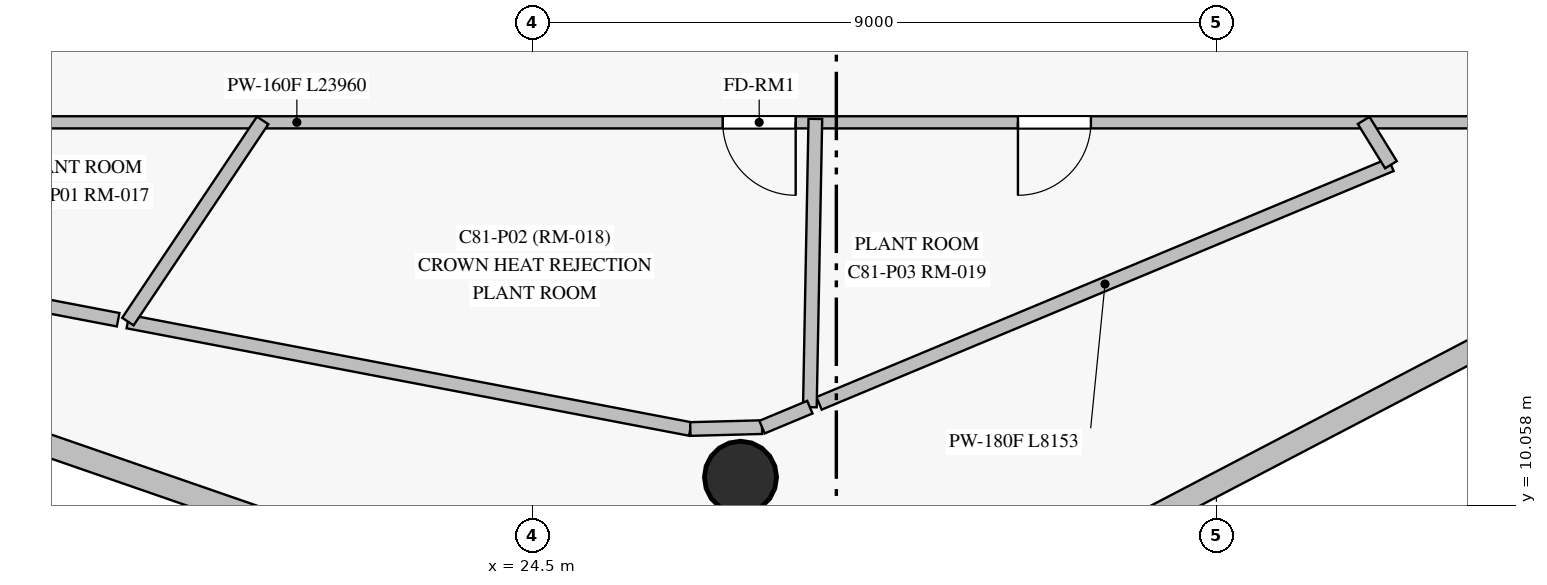
"""IFC4 building model, lengths in metres.
Left out: names, types, materials, properties, quantities, classifications, styles, units other than length and angle.
Written with IfcOpenShell. Run it as: python <this file> out.ifc"""

import sys

from ifc_helpers import new_model, si_unit, direction, frame, frame_2d, origin, origin_with_axes, origin_2d, place, context, subcontext, project, spatial, rectangle, circle, extrude, source, transform, mapped, element, fill, save


model = new_model("IFC4")
c1 = context("Model", 3, precision=1e-05, world=origin(), true_north=direction((0.0, 1.0)))
c2 = subcontext(c1, "Body", "Model", "MODEL_VIEW")
j1 = project(units=[si_unit("LENGTHUNIT", "METRE"), si_unit("PLANEANGLEUNIT", "RADIAN")], contexts=[c1])
p1 = place(None, origin())
s1 = spatial("IfcSite", under=j1, at=p1, CompositionType="ELEMENT")
p2 = place(p1, origin())
s2 = spatial("IfcBuilding", under=s1, at=p2, CompositionType="ELEMENT")
p3 = place(p2, frame((0.0, 0.0, 273.4)))
s3 = spatial("IfcBuildingStorey", under=s2, at=p3, CompositionType="ELEMENT", Elevation=273.4)
m1 = source(origin_with_axes(), c2, "Body", "SweptSolid", [
    extrude(circle(Radius=0.475, at=origin_2d()), origin(), (0.0, 0.0, 1.0), 16.6),
])
p4 = place(p3, frame((27.239, 10.43, 0.0), z_axis=(0.0, 0.0, 1.0), x_axis=(1.0, 0.0, 0.0)))
e1 = element("IfcColumn", 1, at=p4, inside=s3, PredefinedType="COLUMN", context=c2, shape_type="MappedRepresentation", body=[
    mapped(m1, transform((0.0, 0.0, 0.0), scale=1.0)),
])
p5 = place(p3, frame((13.414, 12.479, 0.0), z_axis=(0.0, 0.0, 1.0), x_axis=(0.945081634544, -0.326834367912, 0.0)))
e2 = element("IfcWall", 2, at=p5, inside=s3, PredefinedType="SOLIDWALL", context=c2, shape_type="SweptSolid", body=[
    extrude(rectangle(XDim=10.869, YDim=0.3, at=frame_2d((5.435, 0.0))), origin(), (0.0, 0.0, 1.0), 16.35),
])
p6 = place(p3, frame((32.355, 9.74, 0.0), z_axis=(0.0, 0.0, 1.0), x_axis=(0.886211058158, 0.463281728972, 0.0)))
e3 = element("IfcWall", 3, at=p6, inside=s3, PredefinedType="SOLIDWALL", context=c2, shape_type="SweptSolid", body=[
    extrude(rectangle(XDim=11.876, YDim=0.3, at=frame_2d((5.938, 0.0))), origin(), (0.0, 0.0, 1.0), 16.35),
])
p7 = place(p3, frame((39.76, 15.1, 0.0), z_axis=(0.0, 0.0, 1.0), x_axis=(-1.0, 0.0, 0.0)))
e4 = element("IfcWall", 4, at=p7, inside=s3, PredefinedType="PARTITIONING", context=c2, shape_type="SweptSolid", body=[
    extrude(rectangle(XDim=23.96, YDim=0.16, at=frame_2d((11.98, 0.0))), origin(), (0.0, 0.0, 1.0), 15.65),
])
p8 = place(p7, frame((11.795, 0.0, 0.0)))
e5 = element("IfcOpeningElement", 5, at=p8, cuts=e4, PredefinedType="OPENING", context=c2, shape_type="SweptSolid", body=[
    extrude(rectangle(XDim=0.96, YDim=2.15, at=frame_2d((0.48, 1.075))), frame((0.0, 0.09, 0.0), z_axis=(0.0, -1.0, 0.0), x_axis=(1.0, 0.0, 0.0)), (0.0, 0.0, 1.0), 0.18),
])
p9 = place(p7, frame((7.911, 0.0, 0.0)))
e6 = element("IfcOpeningElement", 6, at=p9, cuts=e4, PredefinedType="OPENING", context=c2, shape_type="SweptSolid", body=[
    extrude(rectangle(XDim=0.96, YDim=2.15, at=frame_2d((0.48, 1.075))), frame((0.0, 0.09, 0.0), z_axis=(0.0, -1.0, 0.0), x_axis=(1.0, 0.0, 0.0)), (0.0, 0.0, 1.0), 0.18),
])
p10 = place(p3, frame((35.797, 14.542, 0.0), z_axis=(0.0, 0.0, 1.0), x_axis=(-0.922909385412, -0.3850172286, 0.0)))
e7 = element("IfcWall", 7, at=p10, inside=s3, PredefinedType="PARTITIONING", context=c2, shape_type="SweptSolid", body=[
    extrude(rectangle(XDim=8.153, YDim=0.18, at=frame_2d((4.076, 0.0))), origin(), (0.0, 0.0, 1.0), 15.65),
])
p11 = place(p3, frame((26.579, 11.065, 0.0), z_axis=(0.0, 0.0, 1.0), x_axis=(-0.982245124485, 0.187602013383, 0.0)))
e8 = element("IfcWall", 8, at=p11, inside=s3, PredefinedType="PARTITIONING", context=c2, shape_type="SweptSolid", body=[
    extrude(rectangle(XDim=7.534, YDim=0.18, at=frame_2d((3.767, 0.0))), origin(), (0.0, 0.0, 1.0), 15.65),
])
p12 = place(p3, frame((28.224, 15.145, 0.0), z_axis=(0.0, 0.0, 1.0), x_axis=(-0.019051517767, -0.999818503365, 0.0)))
e9 = element("IfcWall", 9, at=p12, inside=s3, PredefinedType="PARTITIONING", context=c2, shape_type="SweptSolid", body=[
    extrude(rectangle(XDim=3.793, YDim=0.18, at=frame_2d((1.896, 0.0))), origin(), (0.0, 0.0, 1.0), 16.35),
])
p13 = place(p3, frame((19.179, 12.479, 0.0), z_axis=(0.0, 0.0, 1.0), x_axis=(0.556573567223, 0.830798329481, 0.0)))
e10 = element("IfcWall", 10, at=p13, inside=s3, PredefinedType="PARTITIONING", context=c2, shape_type="SweptSolid", body=[
    extrude(rectangle(XDim=3.186, YDim=0.18, at=frame_2d((1.593, 0.0))), origin(), (0.0, 0.0, 1.0), 16.35),
])
p14 = place(p3, frame((19.051, 12.503, 0.0), z_axis=(0.0, 0.0, 1.0), x_axis=(-0.982234125925, 0.187659590397, 0.0)))
e11 = element("IfcWall", 11, at=p14, inside=s3, PredefinedType="PARTITIONING", context=c2, shape_type="SweptSolid", body=[
    extrude(rectangle(XDim=1.311, YDim=0.18, at=frame_2d((0.656, 0.0))), origin(), (0.0, 0.0, 1.0), 15.65),
])
p15 = place(p3, frame((27.522, 11.09, 0.0), z_axis=(0.0, 0.0, 1.0), x_axis=(-0.99965176757, -0.026388323057, 0.0)))
e12 = element("IfcWall", 12, at=p15, inside=s3, PredefinedType="PARTITIONING", context=c2, shape_type="SweptSolid", body=[
    extrude(rectangle(XDim=0.944, YDim=0.18, at=frame_2d((0.472, 0.0))), origin(), (0.0, 0.0, 1.0), 15.65),
])
p16 = place(p3, frame((35.437, 15.125, 0.0), z_axis=(0.0, 0.0, 1.0), x_axis=(0.524673636587, -0.851303456513, 0.0)))
e13 = element("IfcWall", 13, at=p16, inside=s3, PredefinedType="PARTITIONING", context=c2, shape_type="SweptSolid", body=[
    extrude(rectangle(XDim=0.685, YDim=0.18, at=frame_2d((0.343, 0.0))), origin(), (0.0, 0.0, 1.0), 16.35),
])
p17 = place(p3, frame((28.152, 11.353, 0.0), z_axis=(0.0, 0.0, 1.0), x_axis=(-0.922917907921, -0.384996798997, 0.0)))
e14 = element("IfcWall", 14, at=p17, inside=s3, PredefinedType="PARTITIONING", context=c2, shape_type="SweptSolid", body=[
    extrude(rectangle(XDim=0.682, YDim=0.18, at=frame_2d((0.341, 0.0))), origin(), (0.0, 0.0, 1.0), 15.65),
])
m2 = source(origin_with_axes(), c2, "Body", "SweptSolid", [
    extrude(rectangle(XDim=0.96, YDim=2.15, at=frame_2d((0.48, 1.075))), frame((0.0, 0.025, 0.0), z_axis=(0.0, -1.0, 0.0), x_axis=(1.0, 0.0, 0.0)), (0.0, 0.0, 1.0), 0.05),
])
p18 = place(p8, origin())
e15 = element("IfcDoor", 15, at=p18, inside=s3, OperationType="SINGLE_SWING_LEFT", PredefinedType="DOOR", context=c2, shape_type="MappedRepresentation", body=[
    mapped(m2, transform((0.0, 0.0, 0.0), scale=1.0)),
])
fill(e5, e15)
p19 = place(p9, origin())
e16 = element("IfcDoor", 16, at=p19, inside=s3, OperationType="SINGLE_SWING_RIGHT", PredefinedType="DOOR", context=c2, shape_type="MappedRepresentation", body=[
    mapped(m2, transform((0.0, 0.0, 0.0), scale=1.0)),
])
fill(e6, e16)
save(model, sys.argv[1])
